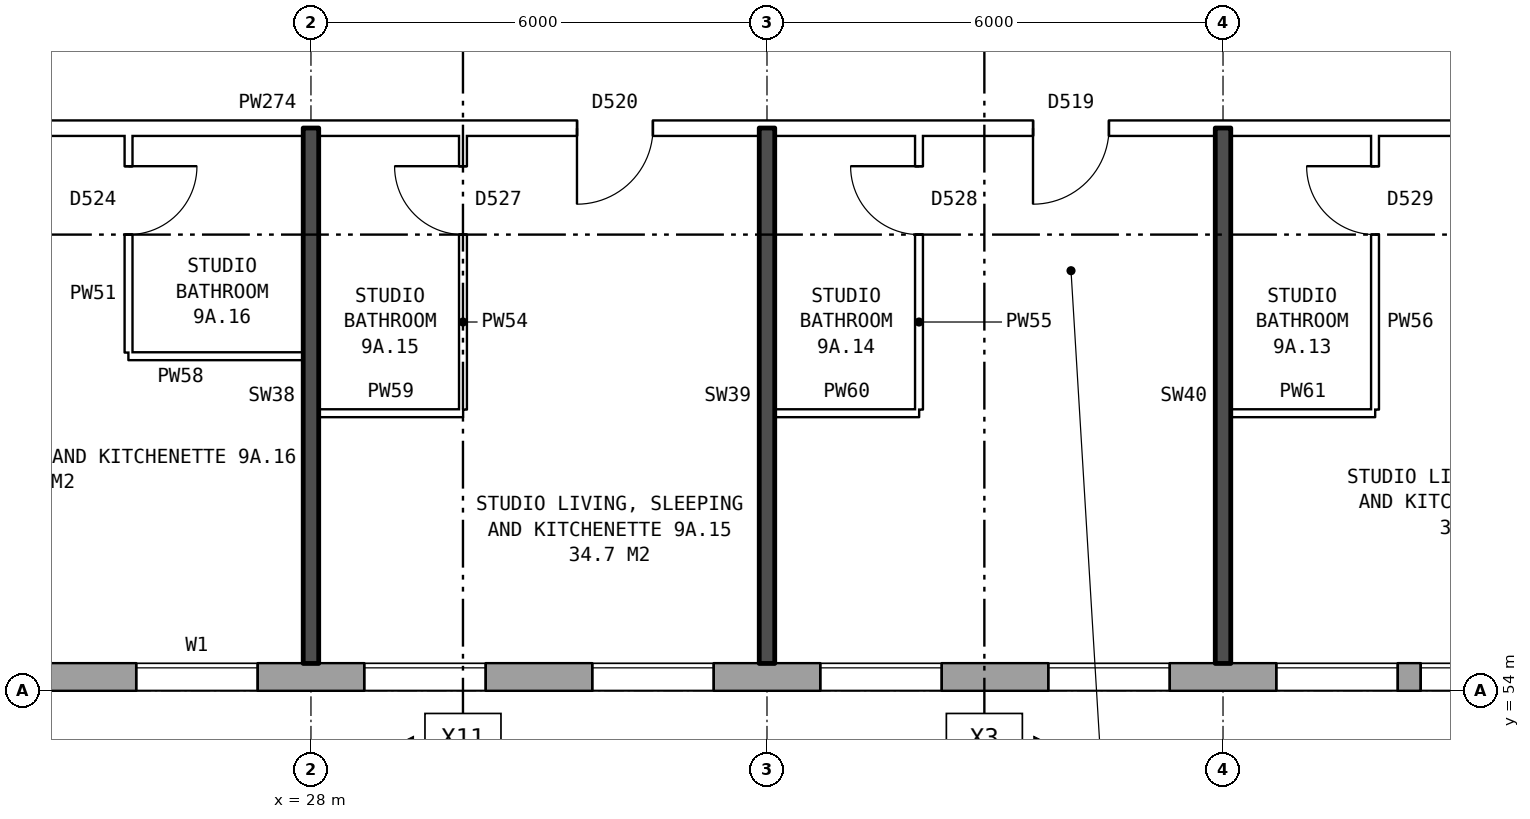
"""IFC4 building model, lengths in metres.
Left out: names, types, materials, properties, quantities, classifications, styles, units other than length and angle.
Written with IfcOpenShell. Run it as: python <this file> out.ifc"""

import sys

from ifc_helpers import new_model, si_unit, direction, frame, frame_2d, origin, place, context, subcontext, project, spatial, rectangle, extrude, element, fill, save


model = new_model("IFC4")
c1 = context("Model", 3, precision=1e-05, world=origin(), true_north=direction((0.0, 1.0)))
c2 = subcontext(c1, "Body", "Model", "MODEL_VIEW")
j1 = project(units=[si_unit("LENGTHUNIT", "METRE"), si_unit("PLANEANGLEUNIT", "RADIAN")], contexts=[c1])
p1 = place(None, origin())
s1 = spatial("IfcSite", under=j1, at=p1, CompositionType="ELEMENT")
p2 = place(p1, origin())
s2 = spatial("IfcBuilding", under=s1, at=p2, CompositionType="ELEMENT")
p3 = place(p2, frame((0.0, 0.0, 35.0)))
s3 = spatial("IfcBuildingStorey", under=s2, at=p3, CompositionType="ELEMENT", Elevation=35.0)
p4 = place(p3, frame((22.825, 54.18, 0.0), z_axis=(0.0, 0.0, 1.0), x_axis=(1.0, 0.0, 0.0)))
e1 = element("IfcWall", 1, at=p4, inside=s3, PredefinedType="STANDARD", context=c2, shape_type="SweptSolid", body=[
    extrude(rectangle(XDim=50.101, YDim=0.36, at=frame_2d((25.05, 0.0))), origin(), (0.0, 0.0, 1.0), 2.85),
])
p5 = place(p4, frame((2.875, 0.0, 0.8)))
e2 = element("IfcOpeningElement", 2, at=p5, cuts=e1, PredefinedType="OPENING", context=c2, shape_type="SweptSolid", body=[
    extrude(rectangle(XDim=1.6, YDim=1.8, at=frame_2d((0.8, 0.9))), frame((0.0, 0.19, 0.0), z_axis=(0.0, -1.0, 0.0), x_axis=(1.0, 0.0, 0.0)), (0.0, 0.0, 1.0), 0.38),
])
p6 = place(p4, frame((5.875, 0.0, 0.8)))
e3 = element("IfcOpeningElement", 3, at=p6, cuts=e1, PredefinedType="OPENING", context=c2, shape_type="SweptSolid", body=[
    extrude(rectangle(XDim=1.6, YDim=1.8, at=frame_2d((0.8, 0.9))), frame((0.0, 0.19, 0.0), z_axis=(0.0, -1.0, 0.0), x_axis=(1.0, 0.0, 0.0)), (0.0, 0.0, 1.0), 0.38),
])
p7 = place(p4, frame((8.875, 0.0, 0.8)))
e4 = element("IfcOpeningElement", 4, at=p7, cuts=e1, PredefinedType="OPENING", context=c2, shape_type="SweptSolid", body=[
    extrude(rectangle(XDim=1.6, YDim=1.8, at=frame_2d((0.8, 0.9))), frame((0.0, 0.19, 0.0), z_axis=(0.0, -1.0, 0.0), x_axis=(1.0, 0.0, 0.0)), (0.0, 0.0, 1.0), 0.38),
])
p8 = place(p4, frame((11.875, 0.0, 0.8)))
e5 = element("IfcOpeningElement", 5, at=p8, cuts=e1, PredefinedType="OPENING", context=c2, shape_type="SweptSolid", body=[
    extrude(rectangle(XDim=1.6, YDim=1.8, at=frame_2d((0.8, 0.9))), frame((0.0, 0.19, 0.0), z_axis=(0.0, -1.0, 0.0), x_axis=(1.0, 0.0, 0.0)), (0.0, 0.0, 1.0), 0.38),
])
p9 = place(p4, frame((14.875, 0.0, 0.8)))
e6 = element("IfcOpeningElement", 6, at=p9, cuts=e1, PredefinedType="OPENING", context=c2, shape_type="SweptSolid", body=[
    extrude(rectangle(XDim=1.6, YDim=1.8, at=frame_2d((0.8, 0.9))), frame((0.0, 0.19, 0.0), z_axis=(0.0, -1.0, 0.0), x_axis=(1.0, 0.0, 0.0)), (0.0, 0.0, 1.0), 0.38),
])
p10 = place(p4, frame((17.875, 0.0, 0.8)))
e7 = element("IfcOpeningElement", 7, at=p10, cuts=e1, PredefinedType="OPENING", context=c2, shape_type="SweptSolid", body=[
    extrude(rectangle(XDim=1.6, YDim=1.8, at=frame_2d((0.8, 0.9))), frame((0.0, 0.19, 0.0), z_axis=(0.0, -1.0, 0.0), x_axis=(1.0, 0.0, 0.0)), (0.0, 0.0, 1.0), 0.38),
])
p11 = place(p4, frame((19.775, 0.0, 0.8)))
e8 = element("IfcOpeningElement", 8, at=p11, cuts=e1, PredefinedType="OPENING", context=c2, shape_type="SweptSolid", body=[
    extrude(rectangle(XDim=1.6, YDim=1.8, at=frame_2d((0.8, 0.9))), frame((0.0, 0.19, 0.0), z_axis=(0.0, -1.0, 0.0), x_axis=(1.0, 0.0, 0.0)), (0.0, 0.0, 1.0), 0.38),
])
p12 = place(p4, frame((23.375, 0.0, 0.15)))
e9 = element("IfcOpeningElement", 9, at=p12, cuts=e1, PredefinedType="OPENING", context=c2, shape_type="SweptSolid", body=[
    extrude(rectangle(XDim=0.6, YDim=0.9, at=frame_2d((0.3, 0.45))), frame((0.0, 0.19, 0.0), z_axis=(0.0, -1.0, 0.0), x_axis=(1.0, 0.0, 0.0)), (0.0, 0.0, 1.0), 0.38),
])
p13 = place(p4, frame((27.275, 0.0, 1.7)))
e10 = element("IfcOpeningElement", 10, at=p13, cuts=e1, PredefinedType="OPENING", context=c2, shape_type="SweptSolid", body=[
    extrude(rectangle(XDim=0.6, YDim=0.9, at=frame_2d((0.3, 0.45))), frame((0.0, 0.19, 0.0), z_axis=(0.0, -1.0, 0.0), x_axis=(1.0, 0.0, 0.0)), (0.0, 0.0, 1.0), 0.38),
])
p14 = place(p4, frame((29.875, 0.0, 0.8)))
e11 = element("IfcOpeningElement", 11, at=p14, cuts=e1, PredefinedType="OPENING", context=c2, shape_type="SweptSolid", body=[
    extrude(rectangle(XDim=1.6, YDim=1.8, at=frame_2d((0.8, 0.9))), frame((0.0, 0.19, 0.0), z_axis=(0.0, -1.0, 0.0), x_axis=(1.0, 0.0, 0.0)), (0.0, 0.0, 1.0), 0.38),
])
p15 = place(p4, frame((32.875, 0.0, 0.8)))
e12 = element("IfcOpeningElement", 12, at=p15, cuts=e1, PredefinedType="OPENING", context=c2, shape_type="SweptSolid", body=[
    extrude(rectangle(XDim=1.6, YDim=1.8, at=frame_2d((0.8, 0.9))), frame((0.0, 0.19, 0.0), z_axis=(0.0, -1.0, 0.0), x_axis=(1.0, 0.0, 0.0)), (0.0, 0.0, 1.0), 0.38),
])
p16 = place(p4, frame((35.875, 0.0, 0.8)))
e13 = element("IfcOpeningElement", 13, at=p16, cuts=e1, PredefinedType="OPENING", context=c2, shape_type="SweptSolid", body=[
    extrude(rectangle(XDim=1.6, YDim=1.8, at=frame_2d((0.8, 0.9))), frame((0.0, 0.19, 0.0), z_axis=(0.0, -1.0, 0.0), x_axis=(1.0, 0.0, 0.0)), (0.0, 0.0, 1.0), 0.38),
])
p17 = place(p4, frame((38.875, 0.0, 0.8)))
e14 = element("IfcOpeningElement", 14, at=p17, cuts=e1, PredefinedType="OPENING", context=c2, shape_type="SweptSolid", body=[
    extrude(rectangle(XDim=1.6, YDim=1.8, at=frame_2d((0.8, 0.9))), frame((0.0, 0.19, 0.0), z_axis=(0.0, -1.0, 0.0), x_axis=(1.0, 0.0, 0.0)), (0.0, 0.0, 1.0), 0.38),
])
p18 = place(p4, frame((41.875, 0.0, 0.8)))
e15 = element("IfcOpeningElement", 15, at=p18, cuts=e1, PredefinedType="OPENING", context=c2, shape_type="SweptSolid", body=[
    extrude(rectangle(XDim=1.6, YDim=1.8, at=frame_2d((0.8, 0.9))), frame((0.0, 0.19, 0.0), z_axis=(0.0, -1.0, 0.0), x_axis=(1.0, 0.0, 0.0)), (0.0, 0.0, 1.0), 0.38),
])
p19 = place(p4, frame((44.875, 0.0, 0.8)))
e16 = element("IfcOpeningElement", 16, at=p19, cuts=e1, PredefinedType="OPENING", context=c2, shape_type="SweptSolid", body=[
    extrude(rectangle(XDim=1.6, YDim=1.8, at=frame_2d((0.8, 0.9))), frame((0.0, 0.19, 0.0), z_axis=(0.0, -1.0, 0.0), x_axis=(1.0, 0.0, 0.0)), (0.0, 0.0, 1.0), 0.38),
])
p20 = place(p4, frame((47.875, 0.0, 0.8)))
e17 = element("IfcOpeningElement", 17, at=p20, cuts=e1, PredefinedType="OPENING", context=c2, shape_type="SweptSolid", body=[
    extrude(rectangle(XDim=1.6, YDim=1.8, at=frame_2d((0.8, 0.9))), frame((0.0, 0.19, 0.0), z_axis=(0.0, -1.0, 0.0), x_axis=(1.0, 0.0, 0.0)), (0.0, 0.0, 1.0), 0.38),
])
p21 = place(p4, frame((21.675, 0.0, 1.4)))
e18 = element("IfcOpeningElement", 18, at=p21, cuts=e1, PredefinedType="OPENING", context=c2, shape_type="SweptSolid", body=[
    extrude(rectangle(XDim=0.6, YDim=1.2, at=frame_2d((0.3, 0.6))), frame((0.0, 0.19, 0.0), z_axis=(0.0, -1.0, 0.0), x_axis=(1.0, 0.0, 0.0)), (0.0, 0.0, 1.0), 0.38),
])
p22 = place(p4, frame((24.275, 0.0, 0.15)))
e19 = element("IfcOpeningElement", 19, at=p22, cuts=e1, PredefinedType="OPENING", context=c2, shape_type="SweptSolid", body=[
    extrude(rectangle(XDim=1.6, YDim=1.5, at=frame_2d((0.8, 0.75))), frame((0.0, 0.19, 0.0), z_axis=(0.0, -1.0, 0.0), x_axis=(1.0, 0.0, 0.0)), (0.0, 0.0, 1.0), 0.38),
])
p23 = place(p4, frame((28.175, 0.0, 1.1)))
e20 = element("IfcOpeningElement", 20, at=p23, cuts=e1, PredefinedType="OPENING", context=c2, shape_type="SweptSolid", body=[
    extrude(rectangle(XDim=0.8, YDim=1.5, at=frame_2d((0.4, 0.75))), frame((0.0, 0.19, 0.0), z_axis=(0.0, -1.0, 0.0), x_axis=(1.0, 0.0, 0.0)), (0.0, 0.0, 1.0), 0.38),
])
for number, where, z_axis, x_axis in (
    (21, (28.1, 57.65, 0.0), (0.0, 0.0, 1.0), (1.0, 0.0, 0.0)),
    (22, (34.1, 57.65, 0.0), (0.0, 0.0, 1.0), (1.0, 0.0, 0.0)),
    (23, (40.1, 57.65, 0.0), (0.0, 0.0, 1.0), (1.0, 0.0, 0.0)),
):
    element("IfcWall", number, at=place(p3, frame(where, z_axis=z_axis, x_axis=x_axis)), inside=s3, PredefinedType="PARTITIONING", context=c2, shape_type="SweptSolid", body=[
        extrude(rectangle(XDim=1.9, YDim=0.1, at=frame_2d((0.95, 0.0))), origin(), (0.0, 0.0, 1.0), 2.85),
    ])
p24 = place(p3, frame((25.6, 58.4, 0.0), z_axis=(0.0, 0.0, 1.0), x_axis=(1.0, 0.0, 0.0)))
e24 = element("IfcWall", 24, at=p24, inside=s3, PredefinedType="PARTITIONING", context=c2, shape_type="SweptSolid", body=[
    extrude(rectangle(XDim=2.3, YDim=0.1, at=frame_2d((1.15, 0.0))), origin(), (0.0, 0.0, 1.0), 2.85),
])
p25 = place(p3, frame((20.11, 61.4, 0.0), z_axis=(0.0, 0.0, 1.0), x_axis=(1.0, 0.0, 0.0)))
e25 = element("IfcWall", 25, at=p25, inside=s3, PredefinedType="PARTITIONING", context=c2, shape_type="SweptSolid", body=[
    extrude(rectangle(XDim=25.79, YDim=0.2, at=frame_2d((12.895, 0.0))), origin(), (0.0, 0.0, 1.0), 2.85),
])
p26 = place(p25, frame((23.34, 0.0, 0.0)))
e26 = element("IfcOpeningElement", 26, at=p26, cuts=e25, PredefinedType="OPENING", context=c2, shape_type="SweptSolid", body=[
    extrude(rectangle(XDim=1.0, YDim=2.1, at=frame_2d((0.5, 1.05))), frame((0.0, 0.11, 0.0), z_axis=(0.0, -1.0, 0.0), x_axis=(1.0, 0.0, 0.0)), (0.0, 0.0, 1.0), 0.22),
])
p27 = place(p25, frame((17.39, 0.0, 0.0)))
e27 = element("IfcOpeningElement", 27, at=p27, cuts=e25, PredefinedType="OPENING", context=c2, shape_type="SweptSolid", body=[
    extrude(rectangle(XDim=1.0, YDim=2.1, at=frame_2d((0.5, 1.05))), frame((0.0, 0.11, 0.0), z_axis=(0.0, -1.0, 0.0), x_axis=(1.0, 0.0, 0.0)), (0.0, 0.0, 1.0), 0.22),
])
p28 = place(p25, frame((11.39, 0.0, 0.0)))
e28 = element("IfcOpeningElement", 28, at=p28, cuts=e25, PredefinedType="OPENING", context=c2, shape_type="SweptSolid", body=[
    extrude(rectangle(XDim=1.0, YDim=2.1, at=frame_2d((0.5, 1.05))), frame((0.0, 0.11, 0.0), z_axis=(0.0, -1.0, 0.0), x_axis=(1.0, 0.0, 0.0)), (0.0, 0.0, 1.0), 0.22),
])
p29 = place(p25, frame((2.245, 0.0, 0.0)))
e29 = element("IfcOpeningElement", 29, at=p29, cuts=e25, PredefinedType="OPENING", context=c2, shape_type="SweptSolid", body=[
    extrude(rectangle(XDim=1.0, YDim=2.1, at=frame_2d((0.5, 1.05))), frame((0.0, 0.11, 0.0), z_axis=(0.0, -1.0, 0.0), x_axis=(1.0, 0.0, 0.0)), (0.0, 0.0, 1.0), 0.22),
])
p30 = place(p3, frame((25.6, 58.45, 0.0), z_axis=(0.0, 0.0, 1.0), x_axis=(0.0, 1.0, 0.0)))
e30 = element("IfcWall", 30, at=p30, inside=s3, PredefinedType="PARTITIONING", context=c2, shape_type="SweptSolid", body=[
    extrude(rectangle(XDim=2.85, YDim=0.1, at=frame_2d((1.425, 0.0))), origin(), (0.0, 0.0, 1.0), 2.85),
])
p31 = place(p30, frame((1.55, 0.0, 0.0)))
e31 = element("IfcOpeningElement", 31, at=p31, cuts=e30, PredefinedType="OPENING", context=c2, shape_type="SweptSolid", body=[
    extrude(rectangle(XDim=0.9, YDim=2.1, at=frame_2d((0.45, 1.05))), frame((0.0, 0.06, 0.0), z_axis=(0.0, -1.0, 0.0), x_axis=(1.0, 0.0, 0.0)), (0.0, 0.0, 1.0), 0.12),
])
p32 = place(p3, frame((28.0, 54.36, 0.0), z_axis=(0.0, 0.0, 1.0), x_axis=(0.0, 1.0, 0.0)))
e32 = element("IfcWall", 32, at=p32, inside=s3, PredefinedType="SOLIDWALL", context=c2, shape_type="SweptSolid", body=[
    extrude(rectangle(XDim=7.04, YDim=0.2, at=frame_2d((3.52, 0.0))), origin(), (0.0, 0.0, 1.0), 2.85),
])
p33 = place(p3, frame((30.0, 57.7, 0.0), z_axis=(0.0, 0.0, 1.0), x_axis=(0.0, 1.0, 0.0)))
e33 = element("IfcWall", 33, at=p33, inside=s3, PredefinedType="PARTITIONING", context=c2, shape_type="SweptSolid", body=[
    extrude(rectangle(XDim=3.6, YDim=0.1, at=frame_2d((1.8, 0.0))), origin(), (0.0, 0.0, 1.0), 2.85),
])
p34 = place(p33, frame((2.3, 0.0, 0.0)))
e34 = element("IfcOpeningElement", 34, at=p34, cuts=e33, PredefinedType="OPENING", context=c2, shape_type="SweptSolid", body=[
    extrude(rectangle(XDim=0.9, YDim=2.1, at=frame_2d((0.45, 1.05))), frame((0.0, 0.06, 0.0), z_axis=(0.0, -1.0, 0.0), x_axis=(1.0, 0.0, 0.0)), (0.0, 0.0, 1.0), 0.12),
])
p35 = place(p3, frame((34.0, 54.36, 0.0), z_axis=(0.0, 0.0, 1.0), x_axis=(0.0, 1.0, 0.0)))
e35 = element("IfcWall", 35, at=p35, inside=s3, PredefinedType="SOLIDWALL", context=c2, shape_type="SweptSolid", body=[
    extrude(rectangle(XDim=7.04, YDim=0.2, at=frame_2d((3.52, 0.0))), origin(), (0.0, 0.0, 1.0), 2.85),
])
p36 = place(p3, frame((36.0, 57.7, 0.0), z_axis=(0.0, 0.0, 1.0), x_axis=(0.0, 1.0, 0.0)))
e36 = element("IfcWall", 36, at=p36, inside=s3, PredefinedType="PARTITIONING", context=c2, shape_type="SweptSolid", body=[
    extrude(rectangle(XDim=3.6, YDim=0.1, at=frame_2d((1.8, 0.0))), origin(), (0.0, 0.0, 1.0), 2.85),
])
p37 = place(p36, frame((2.3, 0.0, 0.0)))
e37 = element("IfcOpeningElement", 37, at=p37, cuts=e36, PredefinedType="OPENING", context=c2, shape_type="SweptSolid", body=[
    extrude(rectangle(XDim=0.9, YDim=2.1, at=frame_2d((0.45, 1.05))), frame((0.0, 0.06, 0.0), z_axis=(0.0, -1.0, 0.0), x_axis=(1.0, 0.0, 0.0)), (0.0, 0.0, 1.0), 0.12),
])
p38 = place(p3, frame((40.0, 54.36, 0.0), z_axis=(0.0, 0.0, 1.0), x_axis=(0.0, 1.0, 0.0)))
e38 = element("IfcWall", 38, at=p38, inside=s3, PredefinedType="SOLIDWALL", context=c2, shape_type="SweptSolid", body=[
    extrude(rectangle(XDim=7.04, YDim=0.2, at=frame_2d((3.52, 0.0))), origin(), (0.0, 0.0, 1.0), 2.85),
])
p39 = place(p3, frame((42.0, 57.7, 0.0), z_axis=(0.0, 0.0, 1.0), x_axis=(0.0, 1.0, 0.0)))
e39 = element("IfcWall", 39, at=p39, inside=s3, PredefinedType="PARTITIONING", context=c2, shape_type="SweptSolid", body=[
    extrude(rectangle(XDim=3.6, YDim=0.1, at=frame_2d((1.8, 0.0))), origin(), (0.0, 0.0, 1.0), 2.85),
])
p40 = place(p39, frame((2.3, 0.0, 0.0)))
e40 = element("IfcOpeningElement", 40, at=p40, cuts=e39, PredefinedType="OPENING", context=c2, shape_type="SweptSolid", body=[
    extrude(rectangle(XDim=0.9, YDim=2.1, at=frame_2d((0.45, 1.05))), frame((0.0, 0.06, 0.0), z_axis=(0.0, -1.0, 0.0), x_axis=(1.0, 0.0, 0.0)), (0.0, 0.0, 1.0), 0.12),
])
p41 = place(p5, origin())
e41 = element("IfcWindow", 41, at=p41, inside=s3, PartitioningType="SINGLE_PANEL", PredefinedType="WINDOW", context=c2, shape_type="SweptSolid", body=[
    extrude(rectangle(XDim=1.6, YDim=1.8, at=frame_2d((0.8, 0.9))), frame((0.0, 0.15, 0.0), z_axis=(0.0, -1.0, 0.0), x_axis=(1.0, 0.0, 0.0)), (0.0, 0.0, 1.0), 0.06),
])
fill(e2, e41)
p42 = place(p6, origin())
e42 = element("IfcWindow", 42, at=p42, inside=s3, PartitioningType="SINGLE_PANEL", PredefinedType="WINDOW", context=c2, shape_type="SweptSolid", body=[
    extrude(rectangle(XDim=1.6, YDim=1.8, at=frame_2d((0.8, 0.9))), frame((0.0, 0.15, 0.0), z_axis=(0.0, -1.0, 0.0), x_axis=(1.0, 0.0, 0.0)), (0.0, 0.0, 1.0), 0.06),
])
fill(e3, e42)
p43 = place(p7, origin())
e43 = element("IfcWindow", 43, at=p43, inside=s3, PartitioningType="SINGLE_PANEL", PredefinedType="WINDOW", context=c2, shape_type="SweptSolid", body=[
    extrude(rectangle(XDim=1.6, YDim=1.8, at=frame_2d((0.8, 0.9))), frame((0.0, 0.15, 0.0), z_axis=(0.0, -1.0, 0.0), x_axis=(1.0, 0.0, 0.0)), (0.0, 0.0, 1.0), 0.06),
])
fill(e4, e43)
p44 = place(p8, origin())
e44 = element("IfcWindow", 44, at=p44, inside=s3, PartitioningType="SINGLE_PANEL", PredefinedType="WINDOW", context=c2, shape_type="SweptSolid", body=[
    extrude(rectangle(XDim=1.6, YDim=1.8, at=frame_2d((0.8, 0.9))), frame((0.0, 0.15, 0.0), z_axis=(0.0, -1.0, 0.0), x_axis=(1.0, 0.0, 0.0)), (0.0, 0.0, 1.0), 0.06),
])
fill(e5, e44)
p45 = place(p9, origin())
e45 = element("IfcWindow", 45, at=p45, inside=s3, PartitioningType="SINGLE_PANEL", PredefinedType="WINDOW", context=c2, shape_type="SweptSolid", body=[
    extrude(rectangle(XDim=1.6, YDim=1.8, at=frame_2d((0.8, 0.9))), frame((0.0, 0.15, 0.0), z_axis=(0.0, -1.0, 0.0), x_axis=(1.0, 0.0, 0.0)), (0.0, 0.0, 1.0), 0.06),
])
fill(e6, e45)
p46 = place(p10, origin())
e46 = element("IfcWindow", 46, at=p46, inside=s3, PartitioningType="SINGLE_PANEL", PredefinedType="WINDOW", context=c2, shape_type="SweptSolid", body=[
    extrude(rectangle(XDim=1.6, YDim=1.8, at=frame_2d((0.8, 0.9))), frame((0.0, 0.15, 0.0), z_axis=(0.0, -1.0, 0.0), x_axis=(1.0, 0.0, 0.0)), (0.0, 0.0, 1.0), 0.06),
])
fill(e7, e46)
p47 = place(p11, origin())
e47 = element("IfcWindow", 47, at=p47, inside=s3, PartitioningType="SINGLE_PANEL", PredefinedType="WINDOW", context=c2, shape_type="SweptSolid", body=[
    extrude(rectangle(XDim=1.6, YDim=1.8, at=frame_2d((0.8, 0.9))), frame((0.0, 0.15, 0.0), z_axis=(0.0, -1.0, 0.0), x_axis=(1.0, 0.0, 0.0)), (0.0, 0.0, 1.0), 0.06),
])
fill(e8, e47)
p48 = place(p40, origin())
e48 = element("IfcDoor", 48, at=p48, inside=s3, OperationType="SINGLE_SWING_RIGHT", PredefinedType="DOOR", context=c2, shape_type="SweptSolid", body=[
    extrude(rectangle(XDim=0.9, YDim=2.1, at=frame_2d((0.45, 1.05))), frame((0.0, 0.025, 0.0), z_axis=(0.0, -1.0, 0.0), x_axis=(1.0, 0.0, 0.0)), (0.0, 0.0, 1.0), 0.05),
])
fill(e40, e48)
p49 = place(p27, frame((1.0, 0.0, 0.0), z_axis=(0.0, 0.0, 1.0), x_axis=(-1.0, 0.0, 0.0)))
e49 = element("IfcDoor", 49, at=p49, inside=s3, OperationType="SINGLE_SWING_RIGHT", PredefinedType="DOOR", context=c2, shape_type="SweptSolid", body=[
    extrude(rectangle(XDim=1.0, YDim=2.1, at=frame_2d((0.5, 1.05))), frame((0.0, 0.025, 0.0), z_axis=(0.0, -1.0, 0.0), x_axis=(1.0, 0.0, 0.0)), (0.0, 0.0, 1.0), 0.05),
])
fill(e27, e49)
p50 = place(p37, origin())
e50 = element("IfcDoor", 50, at=p50, inside=s3, OperationType="SINGLE_SWING_RIGHT", PredefinedType="DOOR", context=c2, shape_type="SweptSolid", body=[
    extrude(rectangle(XDim=0.9, YDim=2.1, at=frame_2d((0.45, 1.05))), frame((0.0, 0.025, 0.0), z_axis=(0.0, -1.0, 0.0), x_axis=(1.0, 0.0, 0.0)), (0.0, 0.0, 1.0), 0.05),
])
fill(e37, e50)
p51 = place(p28, frame((1.0, 0.0, 0.0), z_axis=(0.0, 0.0, 1.0), x_axis=(-1.0, 0.0, 0.0)))
e51 = element("IfcDoor", 51, at=p51, inside=s3, OperationType="SINGLE_SWING_RIGHT", PredefinedType="DOOR", context=c2, shape_type="SweptSolid", body=[
    extrude(rectangle(XDim=1.0, YDim=2.1, at=frame_2d((0.5, 1.05))), frame((0.0, 0.025, 0.0), z_axis=(0.0, -1.0, 0.0), x_axis=(1.0, 0.0, 0.0)), (0.0, 0.0, 1.0), 0.05),
])
fill(e28, e51)
p52 = place(p34, origin())
e52 = element("IfcDoor", 52, at=p52, inside=s3, OperationType="SINGLE_SWING_RIGHT", PredefinedType="DOOR", context=c2, shape_type="SweptSolid", body=[
    extrude(rectangle(XDim=0.9, YDim=2.1, at=frame_2d((0.45, 1.05))), frame((0.0, 0.025, 0.0), z_axis=(0.0, -1.0, 0.0), x_axis=(1.0, 0.0, 0.0)), (0.0, 0.0, 1.0), 0.05),
])
fill(e34, e52)
p53 = place(p31, frame((0.9, 0.0, 0.0), z_axis=(0.0, 0.0, 1.0), x_axis=(-1.0, 0.0, 0.0)))
e53 = element("IfcDoor", 53, at=p53, inside=s3, OperationType="SINGLE_SWING_LEFT", PredefinedType="DOOR", context=c2, shape_type="SweptSolid", body=[
    extrude(rectangle(XDim=0.9, YDim=2.1, at=frame_2d((0.45, 1.05))), frame((0.0, 0.025, 0.0), z_axis=(0.0, -1.0, 0.0), x_axis=(1.0, 0.0, 0.0)), (0.0, 0.0, 1.0), 0.05),
])
fill(e31, e53)
save(model, sys.argv[1])
